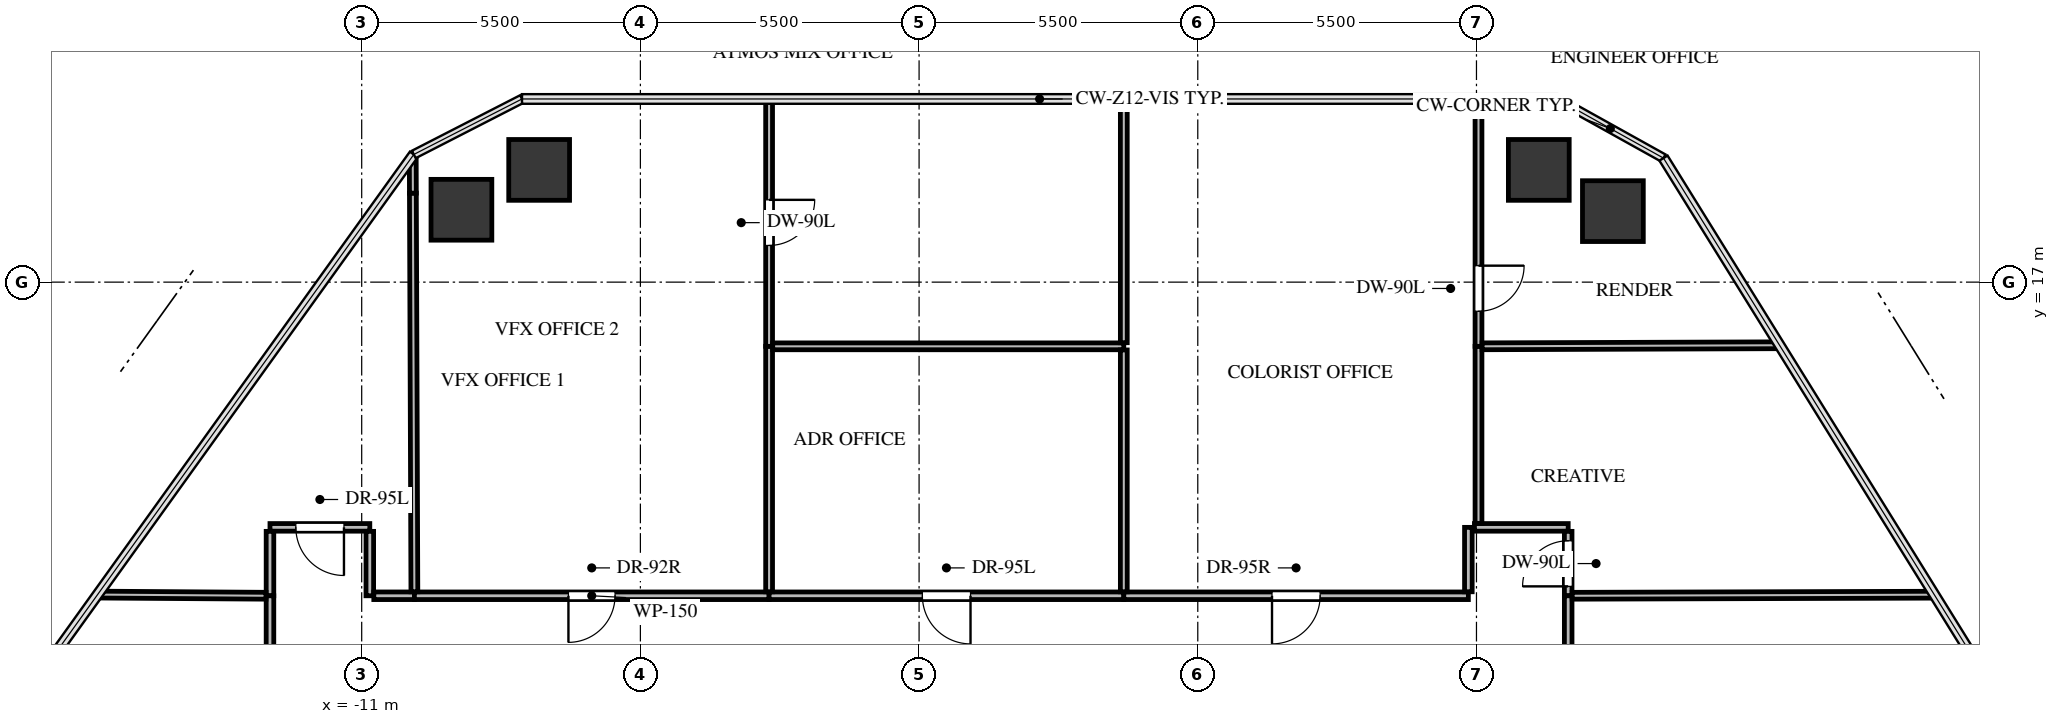
"""IFC4 building model, lengths in metres.
Left out: names, types, materials, properties, quantities, classifications, styles, units other than length and angle.
Written with IfcOpenShell. Run it as: python <this file> out.ifc"""

import sys

from ifc_helpers import new_model, si_unit, direction, frame, frame_2d, origin, origin_2d, place, context, subcontext, project, spatial, rectangle, extrude, source, transform, mapped, element, fill, save


model = new_model("IFC4")
c1 = context("Model", 3, precision=1e-05, world=origin(), true_north=direction((0.0, 1.0)))
c2 = subcontext(c1, "Body", "Model", "MODEL_VIEW")
j1 = project(units=[si_unit("LENGTHUNIT", "METRE"), si_unit("PLANEANGLEUNIT", "RADIAN")], contexts=[c1])
p1 = place(None, origin())
s1 = spatial("IfcSite", under=j1, at=p1, CompositionType="ELEMENT")
p2 = place(p1, origin())
s2 = spatial("IfcBuilding", under=s1, at=p2, CompositionType="ELEMENT")
p3 = place(p2, frame((0.0, 0.0, 107.4)))
s3 = spatial("IfcBuildingStorey", under=s2, at=p3, CompositionType="ELEMENT", Elevation=107.4)
m1 = source(origin(), c2, "Body", "SweptSolid", [
    extrude(rectangle(XDim=1.2, YDim=1.2, at=origin_2d()), origin(), (0.0, 0.0, 1.0), 3.3),
])
for number, where, z_axis, x_axis in (
    (1, (-9.032, 18.428, -0.24), (0.0, 0.0, 1.0), (1.0, 0.0, 0.0)),
    (2, (-7.498, 19.215, -0.24), (0.0, 0.0, 1.0), (1.0, 0.0, 0.0)),
    (3, (12.23, 19.215, -0.24), (0.0, 0.0, 1.0), (1.0, 0.0, 0.0)),
    (4, (13.692, 18.401, -0.24), (0.0, 0.0, 1.0), (1.0, 0.0, 0.0)),
):
    element("IfcColumn", number, at=place(p3, frame(where, z_axis=z_axis, x_axis=x_axis)), inside=s3, PredefinedType="COLUMN", context=c2, shape_type="MappedRepresentation", body=[
        mapped(m1, transform((0.0, 0.0, 0.0), x_axis=(1.0, 0.0, 0.0), y_axis=(0.0, 1.0, 0.0), z_axis=(0.0, 0.0, 1.0), scale=1.0)),
    ])
p4 = place(p3, frame((-10.84, 12.16, 0.0), z_axis=(0.0, 0.0, 1.0), x_axis=(-1.0, 0.0, 0.0)))
e5 = element("IfcWall", 5, at=p4, inside=s3, PredefinedType="PARTITIONING", context=c2, shape_type="SweptSolid", body=[
    extrude(rectangle(XDim=1.97, YDim=0.15, at=frame_2d((0.985, 0.0))), origin(), (0.0, 0.0, 1.0), 3.045),
])
p5 = place(p4, frame((0.51, 0.0, 0.0)))
e6 = element("IfcOpeningElement", 6, at=p5, cuts=e5, PredefinedType="OPENING", context=c2, shape_type="SweptSolid", body=[
    extrude(rectangle(XDim=0.95, YDim=2.1, at=frame_2d((0.475, 1.05))), frame((0.0, 0.085, 0.0), z_axis=(0.0, -1.0, 0.0), x_axis=(1.0, 0.0, 0.0)), (0.0, 0.0, 1.0), 0.17),
])
for number, where, z_axis, x_axis in (
    (7, (-10.84, 10.81, 0.0), (0.0, 0.0, 1.0), (0.0, 1.0, 0.0)),
    (8, (-12.81, 12.081, 0.0), (0.0, 0.0, 1.0), (0.0, -1.0, 0.0)),
):
    element("IfcWall", number, at=place(p3, frame(where, z_axis=z_axis, x_axis=x_axis)), inside=s3, PredefinedType="PARTITIONING", context=c2, shape_type="SweptSolid", body=[
        extrude(rectangle(XDim=1.271, YDim=0.15, at=frame_2d((0.635, 0.0))), origin(), (0.0, 0.0, 1.0), 3.045),
    ])
p6 = place(p3, frame((-9.96, 10.81, 0.0), z_axis=(0.0, 0.0, 1.0), x_axis=(-1.0, 0.0, 0.0)))
e9 = element("IfcWall", 9, at=p6, inside=s3, PredefinedType="PARTITIONING", context=c2, shape_type="SweptSolid", body=[
    extrude(rectangle(XDim=0.801, YDim=0.15, at=frame_2d((0.4, 0.0))), origin(), (0.0, 0.0, 1.0), 3.045),
])
p7 = place(p3, frame((-2.96, 10.81, 0.0), z_axis=(0.0, 0.0, 1.0), x_axis=(-1.0, 0.0, 0.0)))
e10 = element("IfcWall", 10, at=p7, inside=s3, PredefinedType="PARTITIONING", context=c2, shape_type="SweptSolid", body=[
    extrude(rectangle(XDim=7.0, YDim=0.15, at=frame_2d((3.5, 0.0))), origin(), (0.0, 0.0, 1.0), 2.212),
])
p8 = place(p7, frame((3.04, 0.0, 0.0)))
e11 = element("IfcOpeningElement", 11, at=p8, cuts=e10, PredefinedType="OPENING", context=c2, shape_type="SweptSolid", body=[
    extrude(rectangle(XDim=0.92, YDim=2.1, at=frame_2d((0.46, 1.05))), frame((0.0, 0.085, 0.0), z_axis=(0.0, -1.0, 0.0), x_axis=(1.0, 0.0, 0.0)), (0.0, 0.0, 1.0), 0.17),
])
p9 = place(p3, frame((4.04, 10.81, 0.0), z_axis=(0.0, 0.0, 1.0), x_axis=(-1.0, 0.0, 0.0)))
e12 = element("IfcWall", 12, at=p9, inside=s3, PredefinedType="PARTITIONING", context=c2, shape_type="SweptSolid", body=[
    extrude(rectangle(XDim=7.0, YDim=0.15, at=frame_2d((3.5, 0.0))), origin(), (0.0, 0.0, 1.0), 3.045),
])
p10 = place(p9, frame((3.025, 0.0, 0.0)))
e13 = element("IfcOpeningElement", 13, at=p10, cuts=e12, PredefinedType="OPENING", context=c2, shape_type="SweptSolid", body=[
    extrude(rectangle(XDim=0.95, YDim=2.1, at=frame_2d((0.475, 1.05))), frame((0.0, 0.085, 0.0), z_axis=(0.0, -1.0, 0.0), x_axis=(1.0, 0.0, 0.0)), (0.0, 0.0, 1.0), 0.17),
])
p11 = place(p3, frame((10.84, 10.81, 0.0), z_axis=(0.0, 0.0, 1.0), x_axis=(-1.0, 0.0, 0.0)))
e14 = element("IfcWall", 14, at=p11, inside=s3, PredefinedType="PARTITIONING", context=c2, shape_type="SweptSolid", body=[
    extrude(rectangle(XDim=6.8, YDim=0.15, at=frame_2d((3.4, 0.0))), origin(), (0.0, 0.0, 1.0), 2.212),
])
p12 = place(p11, frame((2.925, 0.0, 0.0)))
e15 = element("IfcOpeningElement", 15, at=p12, cuts=e14, PredefinedType="OPENING", context=c2, shape_type="SweptSolid", body=[
    extrude(rectangle(XDim=0.95, YDim=2.1, at=frame_2d((0.475, 1.05))), frame((0.0, 0.085, 0.0), z_axis=(0.0, -1.0, 0.0), x_axis=(1.0, 0.0, 0.0)), (0.0, 0.0, 1.0), 0.17),
])
p13 = place(p3, frame((10.84, 12.16, 0.0), z_axis=(0.0, 0.0, 1.0), x_axis=(0.0, -1.0, 0.0)))
e16 = element("IfcWall", 16, at=p13, inside=s3, PredefinedType="PARTITIONING", context=c2, shape_type="SweptSolid", body=[
    extrude(rectangle(XDim=1.271, YDim=0.15, at=frame_2d((0.635, 0.0))), origin(), (0.0, 0.0, 1.0), 2.212),
])
p14 = place(p3, frame((12.81, 12.16, 0.0), z_axis=(0.0, 0.0, 1.0), x_axis=(-1.0, 0.0, 0.0)))
e17 = element("IfcWall", 17, at=p14, inside=s3, PredefinedType="PARTITIONING", context=c2, shape_type="SweptSolid", body=[
    extrude(rectangle(XDim=1.85, YDim=0.15, at=frame_2d((0.925, 0.0))), origin(), (0.0, 0.0, 1.0), 2.212),
])
p15 = place(p3, frame((12.81, 10.81, 0.0), z_axis=(0.0, 0.0, 1.0), x_axis=(0.0, 1.0, 0.0)))
e18 = element("IfcWall", 18, at=p15, inside=s3, PredefinedType="PARTITIONING", context=c2, shape_type="SweptSolid", body=[
    extrude(rectangle(XDim=1.271, YDim=0.15, at=frame_2d((0.635, 0.0))), origin(), (0.0, 0.0, 1.0), 3.045),
])
p16 = place(p15, frame((0.186, 0.0, 0.0)))
e19 = element("IfcOpeningElement", 19, at=p16, cuts=e18, PredefinedType="OPENING", context=c2, shape_type="SweptSolid", body=[
    extrude(rectangle(XDim=0.9, YDim=2.05, at=frame_2d((0.45, 1.025))), frame((0.0, 0.085, 0.0), z_axis=(0.0, -1.0, 0.0), x_axis=(1.0, 0.0, 0.0)), (0.0, 0.0, 1.0), 0.17),
])
p17 = place(p3, frame((-12.81, 10.81, 0.0), z_axis=(0.0, 0.0, 1.0), x_axis=(0.0, -1.0, 0.0)))
e20 = element("IfcWall", 20, at=p17, inside=s3, PredefinedType="PARTITIONING", context=c2, shape_type="SweptSolid", body=[
    extrude(rectangle(XDim=6.27, YDim=0.15, at=frame_2d((3.135, 0.0))), origin(), (0.0, 0.0, 1.0), 3.045),
])
p18 = place(p17, frame((2.66, 0.0, 0.0)))
e21 = element("IfcOpeningElement", 21, at=p18, cuts=e20, PredefinedType="OPENING", context=c2, shape_type="SweptSolid", body=[
    extrude(rectangle(XDim=0.95, YDim=2.1, at=frame_2d((0.475, 1.05))), frame((0.0, 0.085, 0.0), z_axis=(0.0, -1.0, 0.0), x_axis=(1.0, 0.0, 0.0)), (0.0, 0.0, 1.0), 0.17),
])
p19 = place(p3, frame((12.81, 5.04, 0.0), z_axis=(0.0, 0.0, 1.0), x_axis=(0.0, 1.0, 0.0)))
e22 = element("IfcWall", 22, at=p19, inside=s3, PredefinedType="PARTITIONING", context=c2, shape_type="SweptSolid", body=[
    extrude(rectangle(XDim=5.77, YDim=0.15, at=frame_2d((2.885, 0.0))), origin(), (0.0, 0.0, 1.0), 3.045),
])
p20 = place(p19, frame((2.41, 0.0, 0.0)))
e23 = element("IfcOpeningElement", 23, at=p20, cuts=e22, PredefinedType="OPENING", context=c2, shape_type="SweptSolid", body=[
    extrude(rectangle(XDim=0.95, YDim=2.1, at=frame_2d((0.475, 1.05))), frame((0.0, 0.085, 0.0), z_axis=(0.0, -1.0, 0.0), x_axis=(1.0, 0.0, 0.0)), (0.0, 0.0, 1.0), 0.17),
])
p21 = place(p3, frame((-9.99, 18.756, 0.0), z_axis=(0.0, 0.0, 1.0), x_axis=(0.003754822251, -0.99999295063, 0.0)))
e24 = element("IfcWall", 24, at=p21, inside=s3, PredefinedType="PARTITIONING", context=c2, shape_type="SweptSolid", body=[
    extrude(rectangle(XDim=7.867, YDim=0.135, at=frame_2d((3.934, 0.0))), origin(), (0.0, 0.0, 1.0), 2.38),
])
p22 = place(p3, frame((-9.992, 19.479, 0.0), z_axis=(0.0, 0.0, 1.0), x_axis=(0.003718703158, -0.9999930856, 0.0)))
e25 = element("IfcWall", 25, at=p22, inside=s3, PredefinedType="PARTITIONING", context=c2, shape_type="SweptSolid", body=[
    extrude(rectangle(XDim=0.722, YDim=0.135, at=frame_2d((0.361, 0.0))), origin(), (0.0, 0.0, 1.0), 1.877),
])
p23 = place(p3, frame((-12.889, 10.811, 0.0), z_axis=(0.0, 0.0, 1.0), x_axis=(-0.999976657862, 0.006832549348, 0.0)))
e26 = element("IfcWall", 26, at=p23, inside=s3, PredefinedType="PARTITIONING", context=c2, shape_type="SweptSolid", body=[
    extrude(rectangle(XDim=3.323, YDim=0.135, at=frame_2d((1.662, 0.0))), origin(), (0.0, 0.0, 1.0), 2.38),
])
p24 = place(p3, frame((-2.96, 15.733, 0.0), z_axis=(0.0, 0.0, 1.0), x_axis=(0.0, -1.0, 0.0)))
e27 = element("IfcWall", 27, at=p24, inside=s3, PredefinedType="PARTITIONING", context=c2, shape_type="SweptSolid", body=[
    extrude(rectangle(XDim=4.844, YDim=0.135, at=frame_2d((2.422, 0.0))), origin(), (0.0, 0.0, 1.0), 3.045),
])
p25 = place(p3, frame((-2.96, 20.615, 0.0), z_axis=(0.0, 0.0, 1.0), x_axis=(0.0, -1.0, 0.0)))
e28 = element("IfcWall", 28, at=p25, inside=s3, PredefinedType="PARTITIONING", context=c2, shape_type="SweptSolid", body=[
    extrude(rectangle(XDim=4.882, YDim=0.135, at=frame_2d((2.441, 0.0))), origin(), (0.0, 0.0, 1.0), 2.38),
])
p26 = place(p25, frame((1.991, 0.0, 0.0)))
e29 = element("IfcOpeningElement", 29, at=p26, cuts=e28, PredefinedType="OPENING", context=c2, shape_type="SweptSolid", body=[
    extrude(rectangle(XDim=0.9, YDim=2.05, at=frame_2d((0.45, 1.025))), frame((0.0, 0.078, 0.0), z_axis=(0.0, -1.0, 0.0), x_axis=(1.0, 0.0, 0.0)), (0.0, 0.0, 1.0), 0.155),
])
p27 = place(p3, frame((-2.888, 15.733, 0.0), z_axis=(0.0, 0.0, 1.0), x_axis=(1.0, 0.0, 0.0)))
e30 = element("IfcWall", 30, at=p27, inside=s3, PredefinedType="PARTITIONING", context=c2, shape_type="SweptSolid", body=[
    extrude(rectangle(XDim=6.928, YDim=0.135, at=frame_2d((3.464, 0.0))), origin(), (0.0, 0.0, 1.0), 3.045),
])
p28 = place(p3, frame((4.04, 15.662, 0.0), z_axis=(0.0, 0.0, 1.0), x_axis=(0.0, -1.0, 0.0)))
e31 = element("IfcWall", 31, at=p28, inside=s3, PredefinedType="PARTITIONING", context=c2, shape_type="SweptSolid", body=[
    extrude(rectangle(XDim=4.773, YDim=0.135, at=frame_2d((2.386, 0.0))), origin(), (0.0, 0.0, 1.0), 3.045),
])
p29 = place(p3, frame((4.04, 20.615, 0.0), z_axis=(0.0, 0.0, 1.0), x_axis=(0.0, -1.0, 0.0)))
e32 = element("IfcWall", 32, at=p29, inside=s3, PredefinedType="PARTITIONING", context=c2, shape_type="SweptSolid", body=[
    extrude(rectangle(XDim=4.811, YDim=0.135, at=frame_2d((2.405, 0.0))), origin(), (0.0, 0.0, 1.0), 2.38),
])
p30 = place(p3, frame((11.04, 15.733, 0.0), z_axis=(0.0, 0.0, 1.0), x_axis=(0.0, -1.0, 0.0)))
e33 = element("IfcWall", 33, at=p30, inside=s3, PredefinedType="PARTITIONING", context=c2, shape_type="SweptSolid", body=[
    extrude(rectangle(XDim=3.494, YDim=0.135, at=frame_2d((1.747, 0.0))), origin(), (0.0, 0.0, 1.0), 2.212),
])
p31 = place(p3, frame((11.04, 20.615, 0.0), z_axis=(0.0, 0.0, 1.0), x_axis=(0.0, -1.0, 0.0)))
e34 = element("IfcWall", 34, at=p31, inside=s3, PredefinedType="PARTITIONING", context=c2, shape_type="SweptSolid", body=[
    extrude(rectangle(XDim=4.882, YDim=0.135, at=frame_2d((2.441, 0.0))), origin(), (0.0, 0.0, 1.0), 2.38),
])
p32 = place(p31, frame((3.29, 0.0, 0.0)))
e35 = element("IfcOpeningElement", 35, at=p32, cuts=e34, PredefinedType="OPENING", context=c2, shape_type="SweptSolid", body=[
    extrude(rectangle(XDim=0.9, YDim=2.05, at=frame_2d((0.45, 1.025))), frame((0.0, 0.078, 0.0), z_axis=(0.0, -1.0, 0.0), x_axis=(1.0, 0.0, 0.0)), (0.0, 0.0, 1.0), 0.155),
])
p33 = place(p3, frame((11.112, 15.733, 0.0), z_axis=(0.0, 0.0, 1.0), x_axis=(0.99999375129, 0.003535163403, 0.0)))
e36 = element("IfcWall", 36, at=p33, inside=s3, PredefinedType="PARTITIONING", context=c2, shape_type="SweptSolid", body=[
    extrude(rectangle(XDim=5.87, YDim=0.135, at=frame_2d((2.935, 0.0))), origin(), (0.0, 0.0, 1.0), 2.212),
])
p34 = place(p3, frame((20.035, 10.831, 0.0), z_axis=(0.0, 0.0, 1.0), x_axis=(-0.999995783715, -0.002903885812, 0.0)))
e37 = element("IfcWall", 37, at=p34, inside=s3, PredefinedType="PARTITIONING", context=c2, shape_type="SweptSolid", body=[
    extrude(rectangle(XDim=7.146, YDim=0.135, at=frame_2d((3.573, 0.0))), origin(), (0.0, 0.0, 1.0), 2.38),
])
m2 = source(origin(), c2, "Body", "SweptSolid", [
    extrude(rectangle(XDim=0.95, YDim=2.1, at=frame_2d((0.475, 1.05))), frame((0.0, 0.025, 0.0), z_axis=(0.0, -1.0, 0.0), x_axis=(1.0, 0.0, 0.0)), (0.0, 0.0, 1.0), 0.05),
])
p35 = place(p5, origin())
e38 = element("IfcDoor", 38, at=p35, inside=s3, OperationType="SINGLE_SWING_LEFT", PredefinedType="DOOR", context=c2, shape_type="MappedRepresentation", body=[
    mapped(m2, transform((0.0, 0.0, 0.0), x_axis=(1.0, 0.0, 0.0), y_axis=(0.0, 1.0, 0.0), z_axis=(0.0, 0.0, 1.0), scale=1.0)),
])
fill(e6, e38)
m3 = source(origin(), c2, "Body", "SweptSolid", [
    extrude(rectangle(XDim=0.92, YDim=2.1, at=frame_2d((0.46, 1.05))), frame((0.0, 0.025, 0.0), z_axis=(0.0, -1.0, 0.0), x_axis=(1.0, 0.0, 0.0)), (0.0, 0.0, 1.0), 0.05),
])
p36 = place(p8, origin())
e39 = element("IfcDoor", 39, at=p36, inside=s3, OperationType="SINGLE_SWING_RIGHT", PredefinedType="DOOR", context=c2, shape_type="MappedRepresentation", body=[
    mapped(m3, transform((0.0, 0.0, 0.0), x_axis=(1.0, 0.0, 0.0), y_axis=(0.0, 1.0, 0.0), z_axis=(0.0, 0.0, 1.0), scale=1.0)),
])
fill(e11, e39)
p37 = place(p10, origin())
e40 = element("IfcDoor", 40, at=p37, inside=s3, OperationType="SINGLE_SWING_LEFT", PredefinedType="DOOR", context=c2, shape_type="MappedRepresentation", body=[
    mapped(m2, transform((0.0, 0.0, 0.0), x_axis=(1.0, 0.0, 0.0), y_axis=(0.0, 1.0, 0.0), z_axis=(0.0, 0.0, 1.0), scale=1.0)),
])
fill(e13, e40)
m4 = source(origin(), c2, "Body", "SweptSolid", [
    extrude(rectangle(XDim=0.95, YDim=2.1, at=frame_2d((0.475, 1.05))), frame((0.0, 0.025, 0.0), z_axis=(0.0, -1.0, 0.0), x_axis=(1.0, 0.0, 0.0)), (0.0, 0.0, 1.0), 0.05),
])
p38 = place(p12, origin())
e41 = element("IfcDoor", 41, at=p38, inside=s3, OperationType="SINGLE_SWING_RIGHT", PredefinedType="DOOR", context=c2, shape_type="MappedRepresentation", body=[
    mapped(m4, transform((0.0, 0.0, 0.0), x_axis=(1.0, 0.0, 0.0), y_axis=(0.0, 1.0, 0.0), z_axis=(0.0, 0.0, 1.0), scale=1.0)),
])
fill(e15, e41)
m5 = source(origin(), c2, "Body", "SweptSolid", [
    extrude(rectangle(XDim=0.9, YDim=2.05, at=frame_2d((0.45, 1.025))), frame((0.0, 0.025, 0.0), z_axis=(0.0, -1.0, 0.0), x_axis=(1.0, 0.0, 0.0)), (0.0, 0.0, 1.0), 0.05),
])
p39 = place(p16, origin())
e42 = element("IfcDoor", 42, at=p39, inside=s3, OperationType="SINGLE_SWING_LEFT", PredefinedType="DOOR", context=c2, shape_type="MappedRepresentation", body=[
    mapped(m5, transform((0.0, 0.0, 0.0), x_axis=(1.0, 0.0, 0.0), y_axis=(0.0, 1.0, 0.0), z_axis=(0.0, 0.0, 1.0), scale=1.0)),
])
fill(e19, e42)
p40 = place(p26, origin())
e43 = element("IfcDoor", 43, at=p40, inside=s3, OperationType="SINGLE_SWING_LEFT", PredefinedType="DOOR", context=c2, shape_type="MappedRepresentation", body=[
    mapped(m5, transform((0.0, 0.0, 0.0), x_axis=(1.0, 0.0, 0.0), y_axis=(0.0, 1.0, 0.0), z_axis=(0.0, 0.0, 1.0), scale=1.0)),
])
fill(e29, e43)
p41 = place(p32, origin())
e44 = element("IfcDoor", 44, at=p41, inside=s3, OperationType="SINGLE_SWING_LEFT", PredefinedType="DOOR", context=c2, shape_type="MappedRepresentation", body=[
    mapped(m5, transform((0.0, 0.0, 0.0), x_axis=(1.0, 0.0, 0.0), y_axis=(0.0, 1.0, 0.0), z_axis=(0.0, 0.0, 1.0), scale=1.0)),
])
fill(e35, e44)
save(model, sys.argv[1])
